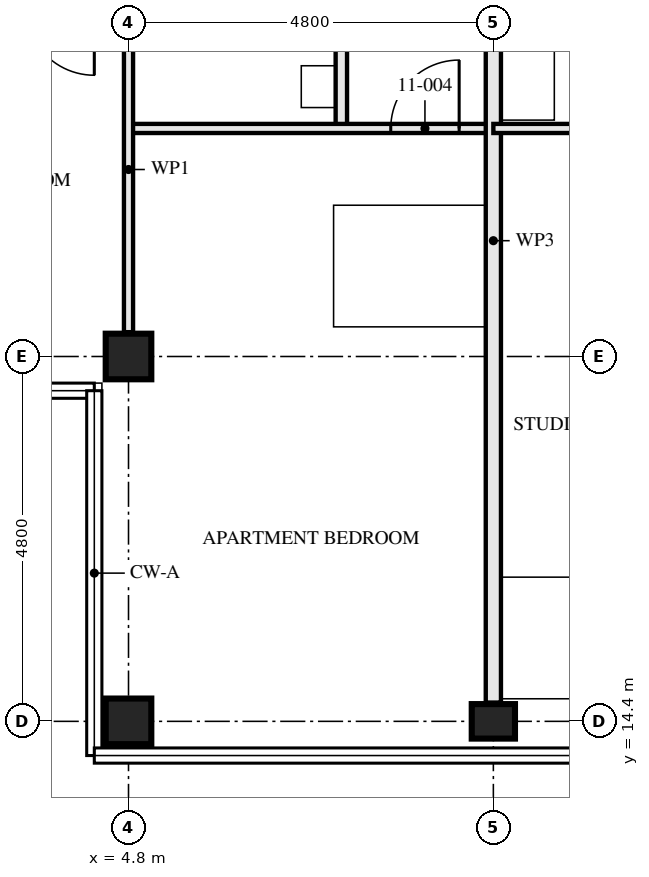
"""IFC4 building model, lengths in metres.
Left out: names, types, materials, properties, quantities, classifications, styles, units other than length and angle.
Written with IfcOpenShell. Run it as: python <this file> out.ifc"""

import sys

from ifc_helpers import new_model, si_unit, direction, frame, frame_2d, origin, origin_2d, place, context, subcontext, project, spatial, rectangle, hollow_rectangle, i_section, extrude, element, fill, save


model = new_model("IFC4")
c1 = context("Model", 3, precision=1e-05, world=origin(), true_north=direction((0.0, 1.0)))
c2 = subcontext(c1, "Body", "Model", "MODEL_VIEW")
j1 = project(units=[si_unit("LENGTHUNIT", "METRE"), si_unit("PLANEANGLEUNIT", "RADIAN")], contexts=[c1])
p1 = place(None, origin())
s1 = spatial("IfcSite", under=j1, at=p1, CompositionType="ELEMENT")
p2 = place(p1, origin())
s2 = spatial("IfcBuilding", under=s1, at=p2, CompositionType="ELEMENT")
p3 = place(p2, frame((0.0, 0.0, 44.5)))
s3 = spatial("IfcBuildingStorey", under=s2, at=p3, CompositionType="ELEMENT", Elevation=44.5)
for number, where, z_axis, x_axis in (
    (1, (4.8, 14.4, 0.0), (0.0, 0.0, 1.0), (0.0, 1.0, 0.0)),
    (2, (4.8, 19.2, 0.0), (0.0, 0.0, 1.0), (0.0, 1.0, 0.0)),
):
    element("IfcColumn", number, at=place(p3, frame(where, z_axis=z_axis, x_axis=x_axis)), inside=s3, PredefinedType="COLUMN", context=c2, shape_type="SweptSolid", body=[
        extrude(hollow_rectangle(XDim=0.6, YDim=0.6, WallThickness=0.05, at=origin_2d()), origin(), (0.0, 0.0, 1.0), 3.5),
    ])
p4 = place(p3, frame((9.6, 14.4, 0.0), z_axis=(0.0, 0.0, 1.0), x_axis=(0.0, 1.0, 0.0)))
e3 = element("IfcColumn", 3, at=p4, inside=s3, PredefinedType="COLUMN", context=c2, shape_type="SweptSolid", body=[
    extrude(i_section(OverallWidth=0.454, OverallDepth=0.569, WebThickness=0.078, FlangeThickness=0.125, FilletRadius=0.015, at=origin_2d()), origin(), (0.0, 0.0, 1.0), 3.5),
])
p5 = place(p3, frame((7.6, 22.2, 0.0), z_axis=(0.0, 0.0, 1.0), x_axis=(0.0, 1.0, 0.0)))
e4 = element("IfcWall", 4, at=p5, inside=s3, PredefinedType="PARTITIONING", context=c2, shape_type="SweptSolid", body=[
    extrude(rectangle(XDim=3.0, YDim=0.15, at=frame_2d((1.5, 0.0))), origin(), (0.0, 0.0, 1.0), 2.55),
])
p6 = place(p5, frame((1.05, 0.0, 0.0)))
e5 = element("IfcOpeningElement", 5, at=p6, cuts=e4, PredefinedType="OPENING", context=c2, shape_type="SweptSolid", body=[
    extrude(rectangle(XDim=0.9, YDim=2.1, at=frame_2d((0.45, 1.05))), frame((0.0, 0.085, 0.0), z_axis=(0.0, -1.0, 0.0), x_axis=(1.0, 0.0, 0.0)), (0.0, 0.0, 1.0), 0.171),
])
p7 = place(p3, frame((4.8, 22.2, 0.0), z_axis=(0.0, 0.0, 1.0), x_axis=(1.0, 0.0, 0.0)))
e6 = element("IfcWall", 6, at=p7, inside=s3, PredefinedType="PARTITIONING", context=c2, shape_type="SweptSolid", body=[
    extrude(rectangle(XDim=4.8, YDim=0.12, at=frame_2d((2.4, 0.0))), origin(), (0.0, 0.0, 1.0), 3.33),
])
p8 = place(p7, frame((3.45, 0.0, 0.0)))
e7 = element("IfcOpeningElement", 7, at=p8, cuts=e6, PredefinedType="OPENING", context=c2, shape_type="SweptSolid", body=[
    extrude(rectangle(XDim=0.9, YDim=2.1, at=frame_2d((0.45, 1.05))), frame((0.0, 0.071, 0.0), z_axis=(0.0, -1.0, 0.0), x_axis=(1.0, 0.0, 0.0)), (0.0, 0.0, 1.0), 0.141),
])
p9 = place(p3, frame((4.8, 19.52, 0.0), z_axis=(0.0, 0.0, 1.0), x_axis=(0.0, 1.0, 0.0)))
e8 = element("IfcWall", 8, at=p9, inside=s3, PredefinedType="PARTITIONING", context=c2, shape_type="SweptSolid", body=[
    extrude(rectangle(XDim=4.28, YDim=0.12, at=frame_2d((2.14, 0.0))), origin(), (0.0, 0.0, 1.0), 3.33),
])
p10 = place(p3, frame((9.6, 14.647, 0.0), z_axis=(0.0, 0.0, 1.0), x_axis=(0.0, 1.0, 0.0)))
e9 = element("IfcWall", 9, at=p10, inside=s3, PredefinedType="PARTITIONING", context=c2, shape_type="SweptSolid", body=[
    extrude(rectangle(XDim=12.153, YDim=0.2, at=frame_2d((6.077, 0.0))), origin(), (0.0, 0.0, 1.0), 2.55),
])
p11 = place(p3, frame((9.6, 22.2, 0.0), z_axis=(0.0, 0.0, 1.0), x_axis=(1.0, 0.0, 0.0)))
e10 = element("IfcWall", 10, at=p11, inside=s3, PredefinedType="PARTITIONING", context=c2, shape_type="SweptSolid", body=[
    extrude(rectangle(XDim=4.8, YDim=0.12, at=frame_2d((2.4, 0.0))), origin(), (0.0, 0.0, 1.0), 3.33),
])
p12 = place(p11, frame((3.45, 0.0, 0.0)))
e11 = element("IfcOpeningElement", 11, at=p12, cuts=e10, PredefinedType="OPENING", context=c2, shape_type="SweptSolid", body=[
    extrude(rectangle(XDim=0.9, YDim=2.1, at=frame_2d((0.45, 1.05))), frame((0.0, 0.071, 0.0), z_axis=(0.0, -1.0, 0.0), x_axis=(1.0, 0.0, 0.0)), (0.0, 0.0, 1.0), 0.141),
])
p13 = place(p8, origin())
e12 = element("IfcDoor", 12, at=p13, inside=s3, OperationType="SINGLE_SWING_LEFT", PredefinedType="DOOR", context=c2, shape_type="SweptSolid", body=[
    extrude(rectangle(XDim=0.9, YDim=2.1, at=frame_2d((0.45, 1.05))), frame((0.0, 0.022, 0.0), z_axis=(0.0, -1.0, 0.0), x_axis=(1.0, 0.0, 0.0)), (0.0, 0.0, 1.0), 0.044),
])
fill(e7, e12)
save(model, sys.argv[1])
